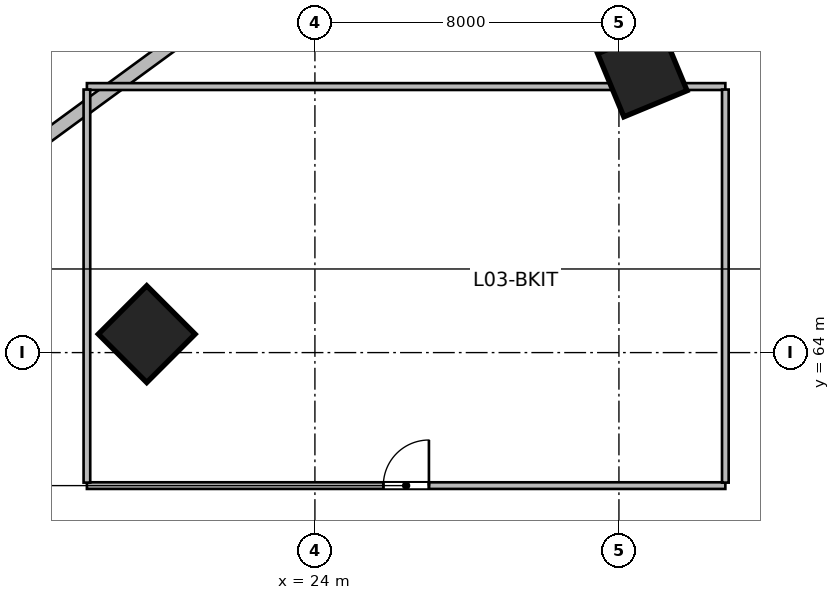
"""IFC4 building model, lengths in metres.
Left out: names, types, materials, properties, quantities, classifications, styles, units other than length and angle.
Written with IfcOpenShell. Run it as: python <this file> out.ifc"""

import sys

from ifc_helpers import new_model, si_unit, direction, frame, frame_2d, origin, origin_2d, place, context, subcontext, project, spatial, rectangle, extrude, source, transform, mapped, element, fill, save


model = new_model("IFC4")
c1 = context("Model", 3, precision=1e-05, world=origin(), true_north=direction((0.0, 1.0)))
c2 = subcontext(c1, "Body", "Model", "MODEL_VIEW")
j1 = project(units=[si_unit("LENGTHUNIT", "METRE"), si_unit("PLANEANGLEUNIT", "RADIAN")], contexts=[c1])
p1 = place(None, origin())
s1 = spatial("IfcSite", under=j1, at=p1, CompositionType="ELEMENT")
p2 = place(p1, origin())
s2 = spatial("IfcBuilding", under=s1, at=p2, CompositionType="ELEMENT")
p3 = place(p2, frame((0.0, 0.0, 18.0)))
s3 = spatial("IfcBuildingStorey", under=s2, at=p3, CompositionType="ELEMENT", Elevation=18.0)
m1 = source(origin(), c2, "Body", "SweptSolid", [
    extrude(rectangle(XDim=1.8, YDim=1.8, at=origin_2d()), origin(), (0.0, 0.0, 1.0), 6.0),
])
for number, where, z_axis, x_axis in (
    (1, (32.616, 71.379, 0.0), (0.0, 0.0, 1.0), (-0.383, 0.924, 0.0)),
    (2, (19.574, 64.486, 0.0), (0.0, 0.0, 1.0), (-0.707, 0.707, 0.0)),
):
    element("IfcColumn", number, at=place(p3, frame(where, z_axis=z_axis, x_axis=x_axis)), inside=s3, PredefinedType="COLUMN", context=c2, shape_type="MappedRepresentation", body=[
        mapped(m1, transform((0.0, 0.0, 0.0), scale=1.0)),
    ])
m2 = source(origin(), c2, "Body", "SweptSolid", [
    extrude(rectangle(XDim=5.547, YDim=0.35, at=frame_2d((2.773, 0.0))), origin(), (0.0, 0.0, 1.0), 5.62),
])
p4 = place(p3, frame((20.302, 72.147, 0.0), z_axis=(0.0, 0.0, 1.0), x_axis=(-0.806767275837, -0.590869327887, 0.0)))
e3 = element("IfcWall", 3, at=p4, inside=s3, PredefinedType="SOLIDWALL", context=c2, shape_type="MappedRepresentation", body=[
    mapped(m2, transform((0.0, 0.0, 0.0), scale=1.0)),
])
m3 = source(origin(), c2, "Body", "SweptSolid", [
    extrude(rectangle(XDim=16.8, YDim=0.175, at=frame_2d((8.4, 0.0))), origin(), (0.0, 0.0, 1.0), 5.62),
])
p5 = place(p3, frame((18.0, 60.5, 0.0), z_axis=(0.0, 0.0, 1.0), x_axis=(1.0, 0.0, 0.0)))
e4 = element("IfcWall", 4, at=p5, inside=s3, PredefinedType="PARTITIONING", context=c2, shape_type="MappedRepresentation", body=[
    mapped(m3, transform((0.0, 0.0, 0.0), scale=1.0)),
])
p6 = place(p5, frame((7.8, 0.0, 0.0)))
e5 = element("IfcOpeningElement", 5, at=p6, cuts=e4, PredefinedType="OPENING", context=c2, shape_type="SweptSolid", body=[
    extrude(rectangle(XDim=1.2, YDim=2.15, at=frame_2d((0.6, 1.075))), frame((0.0, 0.098, 0.0), z_axis=(0.0, -1.0, 0.0), x_axis=(1.0, 0.0, 0.0)), (0.0, 0.0, 1.0), 0.195),
])
m4 = source(origin(), c2, "Body", "SweptSolid", [
    extrude(rectangle(XDim=16.8, YDim=0.18, at=frame_2d((8.4, 0.0))), origin(), (0.0, 0.0, 1.0), 4.681),
])
p7 = place(p3, frame((18.0, 71.0, 0.0), z_axis=(0.0, 0.0, 1.0), x_axis=(1.0, 0.0, 0.0)))
e6 = element("IfcWall", 6, at=p7, inside=s3, PredefinedType="PLUMBINGWALL", context=c2, shape_type="MappedRepresentation", body=[
    mapped(m4, transform((0.0, 0.0, 0.0), scale=1.0)),
])
m5 = source(origin(), c2, "Body", "SweptSolid", [
    extrude(rectangle(XDim=10.343, YDim=0.175, at=frame_2d((5.171, 0.0))), origin(), (0.0, 0.0, 1.0), 5.62),
])
for number, where, z_axis, x_axis in (
    (7, (18.0, 60.579, 0.0), (0.0, 0.0, 1.0), (0.0, 1.0, 0.0)),
    (8, (34.8, 60.579, 0.0), (0.0, 0.0, 1.0), (0.0, 1.0, 0.0)),
):
    element("IfcWall", number, at=place(p3, frame(where, z_axis=z_axis, x_axis=x_axis)), inside=s3, PredefinedType="PARTITIONING", context=c2, shape_type="MappedRepresentation", body=[
        mapped(m5, transform((0.0, 0.0, 0.0), scale=1.0)),
    ])
m6 = source(origin(), c2, "Body", "SweptSolid", [
    extrude(rectangle(XDim=1.2, YDim=2.15, at=frame_2d((0.6, 1.075))), frame((0.0, 0.025, 0.0), z_axis=(0.0, -1.0, 0.0), x_axis=(1.0, 0.0, 0.0)), (0.0, 0.0, 1.0), 0.05),
])
p8 = place(p6, origin())
e9 = element("IfcDoor", 9, at=p8, inside=s3, OperationType="SINGLE_SWING_RIGHT", PredefinedType="DOOR", context=c2, shape_type="MappedRepresentation", body=[
    mapped(m6, transform((0.0, 0.0, 0.0), scale=1.0)),
])
fill(e5, e9)
save(model, sys.argv[1])
